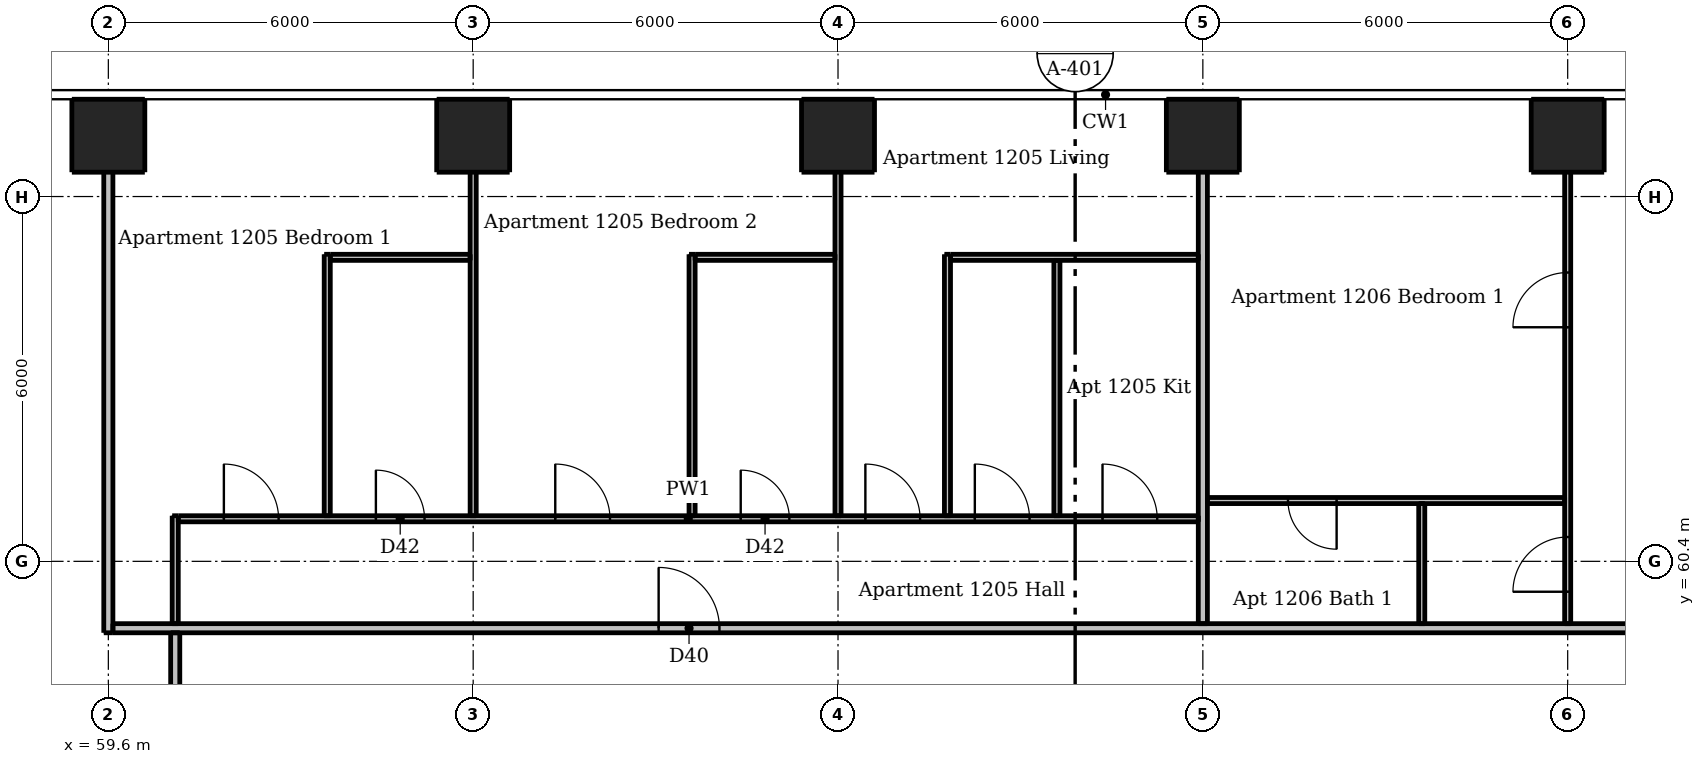
"""IFC4 building model, lengths in metres.
Left out: names, types, materials, properties, quantities, classifications, styles, units other than length and angle.
Written with IfcOpenShell. Run it as: python <this file> out.ifc"""

import sys

from ifc_helpers import new_model, si_unit, direction, frame, frame_2d, origin, origin_2d, place, context, subcontext, project, spatial, rectangle, extrude, element, fill, save


model = new_model("IFC4")
c1 = context("Model", 3, precision=1e-05, world=origin(), true_north=direction((0.0, 1.0)))
c2 = subcontext(c1, "Body", "Model", "MODEL_VIEW")
j1 = project(units=[si_unit("LENGTHUNIT", "METRE"), si_unit("PLANEANGLEUNIT", "RADIAN")], contexts=[c1])
p1 = place(None, origin())
s1 = spatial("IfcSite", under=j1, at=p1, CompositionType="ELEMENT")
p2 = place(p1, origin())
s2 = spatial("IfcBuilding", under=s1, at=p2, CompositionType="ELEMENT")
p3 = place(p2, frame((0.0, 0.0, 46.6)))
s3 = spatial("IfcBuildingStorey", under=s2, at=p3, CompositionType="ELEMENT", Elevation=46.6)
for number, where, z_axis, x_axis in (
    (1, (59.6, 67.4, 0.0), (0.0, 0.0, 1.0), (1.0, 0.0, 0.0)),
    (2, (65.6, 67.4, 0.0), (0.0, 0.0, 1.0), (1.0, 0.0, 0.0)),
    (3, (71.6, 67.4, 0.0), (0.0, 0.0, 1.0), (1.0, 0.0, 0.0)),
    (4, (77.6, 67.4, 0.0), (0.0, 0.0, 1.0), (1.0, 0.0, 0.0)),
    (5, (83.6, 67.4, 0.0), (0.0, 0.0, 1.0), (1.0, 0.0, 0.0)),
):
    element("IfcColumn", number, at=place(p3, frame(where, z_axis=z_axis, x_axis=x_axis)), inside=s3, PredefinedType="COLUMN", context=c2, shape_type="SweptSolid", body=[
        extrude(rectangle(XDim=1.2, YDim=1.2, at=origin_2d()), origin(), (0.0, 0.0, 1.0), 3.05),
    ])
p4 = place(p3, frame((60.7, 59.375, 0.0), z_axis=(0.0, 0.0, 1.0), x_axis=(0.0, 1.0, 0.0)))
e6 = element("IfcWall", 6, at=p4, inside=s3, PredefinedType="PARTITIONING", context=c2, shape_type="SweptSolid", body=[
    extrude(rectangle(XDim=1.775, YDim=0.1, at=frame_2d((0.887, 0.0))), origin(), (0.0, 0.0, 1.0), 3.05),
])
p5 = place(p3, frame((63.2, 61.15, 0.0), z_axis=(0.0, 0.0, 1.0), x_axis=(0.0, 1.0, 0.0)))
e7 = element("IfcWall", 7, at=p5, inside=s3, PredefinedType="PARTITIONING", context=c2, shape_type="SweptSolid", body=[
    extrude(rectangle(XDim=4.3, YDim=0.1, at=frame_2d((2.15, 0.0))), origin(), (0.0, 0.0, 1.0), 3.05),
])
p6 = place(p3, frame((65.6, 61.15, 0.0), z_axis=(0.0, 0.0, 1.0), x_axis=(0.0, 1.0, 0.0)))
e8 = element("IfcWall", 8, at=p6, inside=s3, PredefinedType="PARTITIONING", context=c2, shape_type="SweptSolid", body=[
    extrude(rectangle(XDim=6.85, YDim=0.1, at=frame_2d((3.425, 0.0))), origin(), (0.0, 0.0, 1.0), 2.516),
])
p7 = place(p3, frame((69.2, 61.15, 0.0), z_axis=(0.0, 0.0, 1.0), x_axis=(0.0, 1.0, 0.0)))
e9 = element("IfcWall", 9, at=p7, inside=s3, PredefinedType="PARTITIONING", context=c2, shape_type="SweptSolid", body=[
    extrude(rectangle(XDim=4.3, YDim=0.1, at=frame_2d((2.15, 0.0))), origin(), (0.0, 0.0, 1.0), 3.05),
])
p8 = place(p3, frame((71.6, 61.15, 0.0), z_axis=(0.0, 0.0, 1.0), x_axis=(0.0, 1.0, 0.0)))
e10 = element("IfcWall", 10, at=p8, inside=s3, PredefinedType="PARTITIONING", context=c2, shape_type="SweptSolid", body=[
    extrude(rectangle(XDim=6.85, YDim=0.1, at=frame_2d((3.425, 0.0))), origin(), (0.0, 0.0, 1.0), 2.516),
])
p9 = place(p3, frame((73.4, 61.15, 0.0), z_axis=(0.0, 0.0, 1.0), x_axis=(0.0, 1.0, 0.0)))
e11 = element("IfcWall", 11, at=p9, inside=s3, PredefinedType="PARTITIONING", context=c2, shape_type="SweptSolid", body=[
    extrude(rectangle(XDim=4.3, YDim=0.1, at=frame_2d((2.15, 0.0))), origin(), (0.0, 0.0, 1.0), 3.05),
])
p10 = place(p3, frame((75.2, 61.15, 0.0), z_axis=(0.0, 0.0, 1.0), x_axis=(0.0, 1.0, 0.0)))
e12 = element("IfcWall", 12, at=p10, inside=s3, PredefinedType="PARTITIONING", context=c2, shape_type="SweptSolid", body=[
    extrude(rectangle(XDim=4.2, YDim=0.1, at=frame_2d((2.1, 0.0))), origin(), (0.0, 0.0, 1.0), 3.05),
])
p11 = place(p3, frame((81.2, 59.375, 0.0), z_axis=(0.0, 0.0, 1.0), x_axis=(0.0, 1.0, 0.0)))
e13 = element("IfcWall", 13, at=p11, inside=s3, PredefinedType="PARTITIONING", context=c2, shape_type="SweptSolid", body=[
    extrude(rectangle(XDim=1.975, YDim=0.1, at=frame_2d((0.988, 0.0))), origin(), (0.0, 0.0, 1.0), 3.05),
])
p12 = place(p3, frame((83.6, 59.375, 0.0), z_axis=(0.0, 0.0, 1.0), x_axis=(0.0, 1.0, 0.0)))
e14 = element("IfcWall", 14, at=p12, inside=s3, PredefinedType="PARTITIONING", context=c2, shape_type="SweptSolid", body=[
    extrude(rectangle(XDim=8.625, YDim=0.1, at=frame_2d((4.312, 0.0))), origin(), (0.0, 0.0, 1.0), 2.516),
])
p13 = place(p12, frame((0.525, 0.0, 0.0)))
e15 = element("IfcOpeningElement", 15, at=p13, cuts=e14, PredefinedType="OPENING", context=c2, shape_type="SweptSolid", body=[
    extrude(rectangle(XDim=0.9, YDim=2.1, at=frame_2d((0.45, 1.05))), frame((0.0, 0.06, 0.0), z_axis=(0.0, -1.0, 0.0), x_axis=(1.0, 0.0, 0.0)), (0.0, 0.0, 1.0), 0.12),
])
p14 = place(p12, frame((4.875, 0.0, 0.0)))
e16 = element("IfcOpeningElement", 16, at=p14, cuts=e14, PredefinedType="OPENING", context=c2, shape_type="SweptSolid", body=[
    extrude(rectangle(XDim=0.9, YDim=2.1, at=frame_2d((0.45, 1.05))), frame((0.0, 0.06, 0.0), z_axis=(0.0, -1.0, 0.0), x_axis=(1.0, 0.0, 0.0)), (0.0, 0.0, 1.0), 0.12),
])
for number, where, z_axis, x_axis in (
    (17, (63.25, 65.4, 0.0), (0.0, 0.0, 1.0), (1.0, 0.0, 0.0)),
    (18, (69.25, 65.4, 0.0), (0.0, 0.0, 1.0), (1.0, 0.0, 0.0)),
):
    element("IfcWall", number, at=place(p3, frame(where, z_axis=z_axis, x_axis=x_axis)), inside=s3, PredefinedType="PARTITIONING", context=c2, shape_type="SweptSolid", body=[
        extrude(rectangle(XDim=2.3, YDim=0.1, at=frame_2d((1.15, 0.0))), origin(), (0.0, 0.0, 1.0), 3.05),
    ])
p15 = place(p3, frame((73.45, 65.4, 0.0), z_axis=(0.0, 0.0, 1.0), x_axis=(1.0, 0.0, 0.0)))
e19 = element("IfcWall", 19, at=p15, inside=s3, PredefinedType="PARTITIONING", context=c2, shape_type="SweptSolid", body=[
    extrude(rectangle(XDim=4.075, YDim=0.1, at=frame_2d((2.038, 0.0))), origin(), (0.0, 0.0, 1.0), 3.05),
])
p16 = place(p3, frame((83.55, 61.4, 0.0), z_axis=(0.0, 0.0, 1.0), x_axis=(-1.0, 0.0, 0.0)))
e20 = element("IfcWall", 20, at=p16, inside=s3, PredefinedType="PARTITIONING", context=c2, shape_type="SweptSolid", body=[
    extrude(rectangle(XDim=5.875, YDim=0.1, at=frame_2d((2.938, 0.0))), origin(), (0.0, 0.0, 1.0), 3.05),
])
p17 = place(p16, frame((3.75, 0.0, 0.0)))
e21 = element("IfcOpeningElement", 21, at=p17, cuts=e20, PredefinedType="OPENING", context=c2, shape_type="SweptSolid", body=[
    extrude(rectangle(XDim=0.8, YDim=2.1, at=frame_2d((0.4, 1.05))), frame((0.0, 0.06, 0.0), z_axis=(0.0, -1.0, 0.0), x_axis=(1.0, 0.0, 0.0)), (0.0, 0.0, 1.0), 0.12),
])
p18 = place(p3, frame((60.75, 61.1, 0.0), z_axis=(0.0, 0.0, 1.0), x_axis=(1.0, 0.0, 0.0)))
e22 = element("IfcWall", 22, at=p18, inside=s3, PredefinedType="PARTITIONING", context=c2, shape_type="SweptSolid", body=[
    extrude(rectangle(XDim=16.775, YDim=0.1, at=frame_2d((8.387, 0.0))), origin(), (0.0, 0.0, 1.0), 3.05),
])
p19 = place(p18, frame((11.3, 0.0, 0.0)))
e23 = element("IfcOpeningElement", 23, at=p19, cuts=e22, PredefinedType="OPENING", context=c2, shape_type="SweptSolid", body=[
    extrude(rectangle(XDim=0.9, YDim=2.1, at=frame_2d((0.45, 1.05))), frame((0.0, 0.06, 0.0), z_axis=(0.0, -1.0, 0.0), x_axis=(1.0, 0.0, 0.0)), (0.0, 0.0, 1.0), 0.12),
])
p20 = place(p18, frame((15.2, 0.0, 0.0)))
e24 = element("IfcOpeningElement", 24, at=p20, cuts=e22, PredefinedType="OPENING", context=c2, shape_type="SweptSolid", body=[
    extrude(rectangle(XDim=0.9, YDim=2.1, at=frame_2d((0.45, 1.05))), frame((0.0, 0.06, 0.0), z_axis=(0.0, -1.0, 0.0), x_axis=(1.0, 0.0, 0.0)), (0.0, 0.0, 1.0), 0.12),
])
p21 = place(p18, frame((13.1, 0.0, 0.0)))
e25 = element("IfcOpeningElement", 25, at=p21, cuts=e22, PredefinedType="OPENING", context=c2, shape_type="SweptSolid", body=[
    extrude(rectangle(XDim=0.9, YDim=2.1, at=frame_2d((0.45, 1.05))), frame((0.0, 0.06, 0.0), z_axis=(0.0, -1.0, 0.0), x_axis=(1.0, 0.0, 0.0)), (0.0, 0.0, 1.0), 0.12),
])
p22 = place(p18, frame((0.75, 0.0, 0.0)))
e26 = element("IfcOpeningElement", 26, at=p22, cuts=e22, PredefinedType="OPENING", context=c2, shape_type="SweptSolid", body=[
    extrude(rectangle(XDim=0.9, YDim=2.1, at=frame_2d((0.45, 1.05))), frame((0.0, 0.06, 0.0), z_axis=(0.0, -1.0, 0.0), x_axis=(1.0, 0.0, 0.0)), (0.0, 0.0, 1.0), 0.12),
])
p23 = place(p18, frame((6.2, 0.0, 0.0)))
e27 = element("IfcOpeningElement", 27, at=p23, cuts=e22, PredefinedType="OPENING", context=c2, shape_type="SweptSolid", body=[
    extrude(rectangle(XDim=0.9, YDim=2.1, at=frame_2d((0.45, 1.05))), frame((0.0, 0.06, 0.0), z_axis=(0.0, -1.0, 0.0), x_axis=(1.0, 0.0, 0.0)), (0.0, 0.0, 1.0), 0.12),
])
p24 = place(p18, frame((3.25, 0.0, 0.0)))
e28 = element("IfcOpeningElement", 28, at=p24, cuts=e22, PredefinedType="OPENING", context=c2, shape_type="SweptSolid", body=[
    extrude(rectangle(XDim=0.8, YDim=2.1, at=frame_2d((0.4, 1.05))), frame((0.0, 0.06, 0.0), z_axis=(0.0, -1.0, 0.0), x_axis=(1.0, 0.0, 0.0)), (0.0, 0.0, 1.0), 0.12),
])
p25 = place(p18, frame((9.25, 0.0, 0.0)))
e29 = element("IfcOpeningElement", 29, at=p25, cuts=e22, PredefinedType="OPENING", context=c2, shape_type="SweptSolid", body=[
    extrude(rectangle(XDim=0.8, YDim=2.1, at=frame_2d((0.4, 1.05))), frame((0.0, 0.06, 0.0), z_axis=(0.0, -1.0, 0.0), x_axis=(1.0, 0.0, 0.0)), (0.0, 0.0, 1.0), 0.12),
])
p26 = place(p3, frame((59.6, 59.225, 0.0), z_axis=(0.0, 0.0, 1.0), x_axis=(0.0, 1.0, 0.0)))
e30 = element("IfcWall", 30, at=p26, inside=s3, PredefinedType="PARTITIONING", context=c2, shape_type="SweptSolid", body=[
    extrude(rectangle(XDim=8.775, YDim=0.15, at=frame_2d((4.387, 0.0))), origin(), (0.0, 0.0, 1.0), 2.51),
])
p27 = place(p3, frame((60.7, 30.325, 0.0), z_axis=(0.0, 0.0, 1.0), x_axis=(0.0, 1.0, 0.0)))
e31 = element("IfcWall", 31, at=p27, inside=s3, PredefinedType="PARTITIONING", context=c2, shape_type="SweptSolid", body=[
    extrude(rectangle(XDim=28.9, YDim=0.15, at=frame_2d((14.45, 0.0))), origin(), (0.0, 0.0, 1.0), 3.05),
])
p28 = place(p27, frame((7.375, 0.0, 0.0)))
e32 = element("IfcOpeningElement", 32, at=p28, cuts=e31, PredefinedType="OPENING", context=c2, shape_type="SweptSolid", body=[
    extrude(rectangle(XDim=1.0, YDim=2.1, at=frame_2d((0.5, 1.05))), frame((0.0, 0.085, 0.0), z_axis=(0.0, -1.0, 0.0), x_axis=(1.0, 0.0, 0.0)), (0.0, 0.0, 1.0), 0.17),
])
p29 = place(p27, frame((26.025, 0.0, 0.0)))
e33 = element("IfcOpeningElement", 33, at=p29, cuts=e31, PredefinedType="OPENING", context=c2, shape_type="SweptSolid", body=[
    extrude(rectangle(XDim=1.0, YDim=2.1, at=frame_2d((0.5, 1.05))), frame((0.0, 0.085, 0.0), z_axis=(0.0, -1.0, 0.0), x_axis=(1.0, 0.0, 0.0)), (0.0, 0.0, 1.0), 0.17),
])
p30 = place(p3, frame((77.6, 59.375, 0.0), z_axis=(0.0, 0.0, 1.0), x_axis=(0.0, 1.0, 0.0)))
e34 = element("IfcWall", 34, at=p30, inside=s3, PredefinedType="PARTITIONING", context=c2, shape_type="SweptSolid", body=[
    extrude(rectangle(XDim=8.625, YDim=0.15, at=frame_2d((4.312, 0.0))), origin(), (0.0, 0.0, 1.0), 2.516),
])
p31 = place(p3, frame((59.675, 59.3, 0.0), z_axis=(0.0, 0.0, 1.0), x_axis=(1.0, 0.0, 0.0)))
e35 = element("IfcWall", 35, at=p31, inside=s3, PredefinedType="PARTITIONING", context=c2, shape_type="SweptSolid", body=[
    extrude(rectangle(XDim=28.55, YDim=0.15, at=frame_2d((14.275, 0.0))), origin(), (0.0, 0.0, 1.0), 3.05),
])
p32 = place(p31, frame((8.975, 0.0, 0.0)))
e36 = element("IfcOpeningElement", 36, at=p32, cuts=e35, PredefinedType="OPENING", context=c2, shape_type="SweptSolid", body=[
    extrude(rectangle(XDim=1.0, YDim=2.1, at=frame_2d((0.5, 1.05))), frame((0.0, 0.085, 0.0), z_axis=(0.0, -1.0, 0.0), x_axis=(1.0, 0.0, 0.0)), (0.0, 0.0, 1.0), 0.17),
])
p33 = place(p31, frame((25.775, 0.0, 0.0)))
e37 = element("IfcOpeningElement", 37, at=p33, cuts=e35, PredefinedType="OPENING", context=c2, shape_type="SweptSolid", body=[
    extrude(rectangle(XDim=1.0, YDim=2.1, at=frame_2d((0.5, 1.05))), frame((0.0, 0.085, 0.0), z_axis=(0.0, -1.0, 0.0), x_axis=(1.0, 0.0, 0.0)), (0.0, 0.0, 1.0), 0.17),
])
p34 = place(p32, origin())
e38 = element("IfcDoor", 38, at=p34, inside=s3, OperationType="SINGLE_SWING_LEFT", PredefinedType="DOOR", context=c2, shape_type="SweptSolid", body=[
    extrude(rectangle(XDim=1.0, YDim=2.1, at=frame_2d((0.5, 1.05))), frame((0.0, 0.025, 0.0), z_axis=(0.0, -1.0, 0.0), x_axis=(1.0, 0.0, 0.0)), (0.0, 0.0, 1.0), 0.05),
])
fill(e36, e38)
p35 = place(p19, origin())
e39 = element("IfcDoor", 39, at=p35, inside=s3, OperationType="SINGLE_SWING_LEFT", PredefinedType="DOOR", context=c2, shape_type="SweptSolid", body=[
    extrude(rectangle(XDim=0.9, YDim=2.1, at=frame_2d((0.45, 1.05))), frame((0.0, 0.025, 0.0), z_axis=(0.0, -1.0, 0.0), x_axis=(1.0, 0.0, 0.0)), (0.0, 0.0, 1.0), 0.05),
])
fill(e23, e39)
p36 = place(p20, origin())
e40 = element("IfcDoor", 40, at=p36, inside=s3, OperationType="SINGLE_SWING_LEFT", PredefinedType="DOOR", context=c2, shape_type="SweptSolid", body=[
    extrude(rectangle(XDim=0.9, YDim=2.1, at=frame_2d((0.45, 1.05))), frame((0.0, 0.025, 0.0), z_axis=(0.0, -1.0, 0.0), x_axis=(1.0, 0.0, 0.0)), (0.0, 0.0, 1.0), 0.05),
])
fill(e24, e40)
p37 = place(p21, origin())
e41 = element("IfcDoor", 41, at=p37, inside=s3, OperationType="SINGLE_SWING_LEFT", PredefinedType="DOOR", context=c2, shape_type="SweptSolid", body=[
    extrude(rectangle(XDim=0.9, YDim=2.1, at=frame_2d((0.45, 1.05))), frame((0.0, 0.025, 0.0), z_axis=(0.0, -1.0, 0.0), x_axis=(1.0, 0.0, 0.0)), (0.0, 0.0, 1.0), 0.05),
])
fill(e25, e41)
p38 = place(p22, origin())
e42 = element("IfcDoor", 42, at=p38, inside=s3, OperationType="SINGLE_SWING_LEFT", PredefinedType="DOOR", context=c2, shape_type="SweptSolid", body=[
    extrude(rectangle(XDim=0.9, YDim=2.1, at=frame_2d((0.45, 1.05))), frame((0.0, 0.025, 0.0), z_axis=(0.0, -1.0, 0.0), x_axis=(1.0, 0.0, 0.0)), (0.0, 0.0, 1.0), 0.05),
])
fill(e26, e42)
p39 = place(p23, origin())
e43 = element("IfcDoor", 43, at=p39, inside=s3, OperationType="SINGLE_SWING_LEFT", PredefinedType="DOOR", context=c2, shape_type="SweptSolid", body=[
    extrude(rectangle(XDim=0.9, YDim=2.1, at=frame_2d((0.45, 1.05))), frame((0.0, 0.025, 0.0), z_axis=(0.0, -1.0, 0.0), x_axis=(1.0, 0.0, 0.0)), (0.0, 0.0, 1.0), 0.05),
])
fill(e27, e43)
p40 = place(p24, origin())
e44 = element("IfcDoor", 44, at=p40, inside=s3, OperationType="SINGLE_SWING_LEFT", PredefinedType="DOOR", context=c2, shape_type="SweptSolid", body=[
    extrude(rectangle(XDim=0.8, YDim=2.1, at=frame_2d((0.4, 1.05))), frame((0.0, 0.025, 0.0), z_axis=(0.0, -1.0, 0.0), x_axis=(1.0, 0.0, 0.0)), (0.0, 0.0, 1.0), 0.05),
])
fill(e28, e44)
p41 = place(p25, origin())
e45 = element("IfcDoor", 45, at=p41, inside=s3, OperationType="SINGLE_SWING_LEFT", PredefinedType="DOOR", context=c2, shape_type="SweptSolid", body=[
    extrude(rectangle(XDim=0.8, YDim=2.1, at=frame_2d((0.4, 1.05))), frame((0.0, 0.025, 0.0), z_axis=(0.0, -1.0, 0.0), x_axis=(1.0, 0.0, 0.0)), (0.0, 0.0, 1.0), 0.05),
])
fill(e29, e45)
p42 = place(p13, origin())
e46 = element("IfcDoor", 46, at=p42, inside=s3, OperationType="SINGLE_SWING_LEFT", PredefinedType="DOOR", context=c2, shape_type="SweptSolid", body=[
    extrude(rectangle(XDim=0.9, YDim=2.1, at=frame_2d((0.45, 1.05))), frame((0.0, 0.025, 0.0), z_axis=(0.0, -1.0, 0.0), x_axis=(1.0, 0.0, 0.0)), (0.0, 0.0, 1.0), 0.05),
])
fill(e15, e46)
p43 = place(p14, origin())
e47 = element("IfcDoor", 47, at=p43, inside=s3, OperationType="SINGLE_SWING_LEFT", PredefinedType="DOOR", context=c2, shape_type="SweptSolid", body=[
    extrude(rectangle(XDim=0.9, YDim=2.1, at=frame_2d((0.45, 1.05))), frame((0.0, 0.025, 0.0), z_axis=(0.0, -1.0, 0.0), x_axis=(1.0, 0.0, 0.0)), (0.0, 0.0, 1.0), 0.05),
])
fill(e16, e47)
p44 = place(p17, origin())
e48 = element("IfcDoor", 48, at=p44, inside=s3, OperationType="SINGLE_SWING_LEFT", PredefinedType="DOOR", context=c2, shape_type="SweptSolid", body=[
    extrude(rectangle(XDim=0.8, YDim=2.1, at=frame_2d((0.4, 1.05))), frame((0.0, 0.025, 0.0), z_axis=(0.0, -1.0, 0.0), x_axis=(1.0, 0.0, 0.0)), (0.0, 0.0, 1.0), 0.05),
])
fill(e21, e48)
save(model, sys.argv[1])
